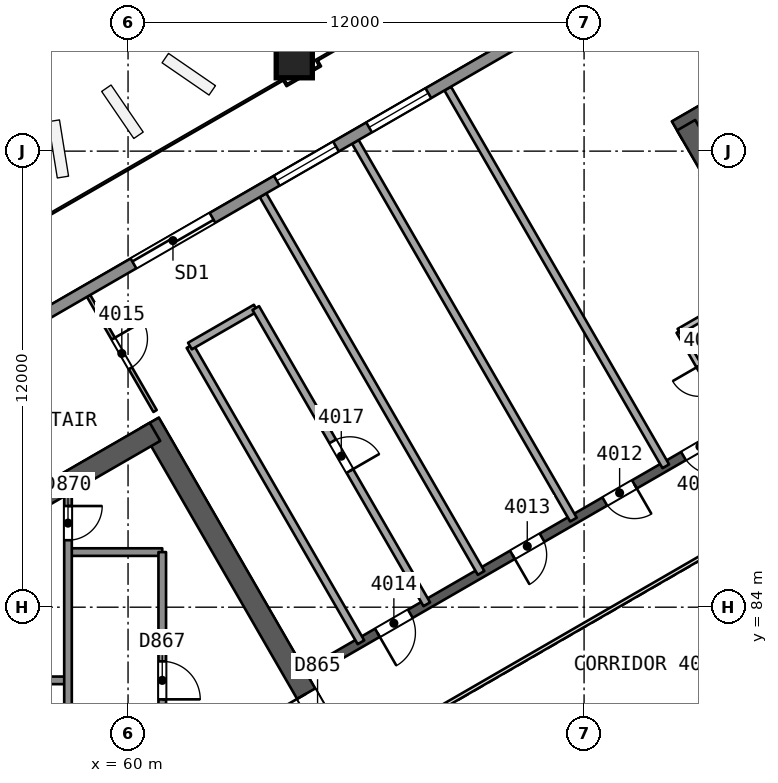
"""IFC4 building model, lengths in metres.
Left out: names, types, materials, properties, quantities, classifications, styles, units other than length and angle.
Written with IfcOpenShell. Run it as: python <this file> out.ifc"""

import sys

from ifc_helpers import new_model, si_unit, direction, frame, frame_2d, origin, origin_2d, place, context, subcontext, project, spatial, rectangle, extrude, element, fill, save


model = new_model("IFC4")
c1 = context("Model", 3, precision=1e-05, world=origin(), true_north=direction((0.0, 1.0)))
c2 = subcontext(c1, "Body", "Model", "MODEL_VIEW")
j1 = project(units=[si_unit("LENGTHUNIT", "METRE"), si_unit("PLANEANGLEUNIT", "RADIAN")], contexts=[c1])
p1 = place(None, origin())
s1 = spatial("IfcSite", under=j1, at=p1, CompositionType="ELEMENT")
p2 = place(p1, origin())
s2 = spatial("IfcBuilding", under=s1, at=p2, CompositionType="ELEMENT")
p3 = place(p2, frame((0.0, 0.0, 167.4)))
s3 = spatial("IfcBuildingStorey", under=s2, at=p3, CompositionType="ELEMENT", Elevation=167.4)
p4 = place(p3, frame((65.682, 80.0, 0.0), z_axis=(0.0, 0.0, 1.0), x_axis=(-0.500000202252, 0.866025287014, 0.0)))
e1 = element("IfcWall", 1, at=p4, inside=s3, PredefinedType="SHEAR", context=c2, shape_type="SweptSolid", body=[
    extrude(rectangle(XDim=10.221, YDim=0.55, at=frame_2d((5.111, 0.0))), origin(), (0.0, 0.0, 1.0), 3.7),
])
p5 = place(p4, frame((0.791, 0.0, 0.0)))
e2 = element("IfcOpeningElement", 2, at=p5, cuts=e1, PredefinedType="OPENING", context=c2, shape_type="SweptSolid", body=[
    extrude(rectangle(XDim=1.2, YDim=2.1, at=frame_2d((0.6, 1.05))), frame((0.0, 0.286, 0.0), z_axis=(0.0, -1.0, 0.0), x_axis=(1.0, 0.0, 0.0)), (0.0, 0.0, 1.0), 0.571),
])
p6 = place(p3, frame((60.709, 88.614, 0.0), z_axis=(0.0, 0.0, 1.0), x_axis=(-0.866020164116, -0.500009075263, 0.0)))
e3 = element("IfcWall", 3, at=p6, inside=s3, PredefinedType="SHEAR", context=c2, shape_type="SweptSolid", body=[
    extrude(rectangle(XDim=14.058, YDim=0.55, at=frame_2d((7.029, 0.0))), origin(), (0.0, 0.0, 1.0), 3.7),
])
p7 = place(p3, frame((86.723, 103.633, 0.0), z_axis=(0.0, 0.0, 1.0), x_axis=(-0.866023530946, -0.500003243837, 0.0)))
e4 = element("IfcWall", 4, at=p7, inside=s3, PredefinedType="SHEAR", context=c2, shape_type="SweptSolid", body=[
    extrude(rectangle(XDim=14.175, YDim=0.55, at=frame_2d((7.087, 0.0))), origin(), (0.0, 0.0, 1.0), 3.7),
])
p8 = place(p3, frame((74.686, 96.683, 0.0), z_axis=(0.0, 0.0, 1.0), x_axis=(0.499997818338, -0.866026663364, 0.0)))
e5 = element("IfcWall", 5, at=p8, inside=s3, PredefinedType="SHEAR", context=c2, shape_type="SweptSolid", body=[
    extrude(rectangle(XDim=10.105, YDim=0.55, at=frame_2d((5.052, 0.0))), origin(), (0.0, 0.0, 1.0), 3.7),
])
p9 = place(p8, frame((7.955, 0.0, 0.0)))
e6 = element("IfcOpeningElement", 6, at=p9, cuts=e5, PredefinedType="OPENING", context=c2, shape_type="SweptSolid", body=[
    extrude(rectangle(XDim=1.2, YDim=2.1, at=frame_2d((0.6, 1.05))), frame((0.0, 0.286, 0.0), z_axis=(0.0, -1.0, 0.0), x_axis=(1.0, 0.0, 0.0)), (0.0, 0.0, 1.0), 0.571),
])
p10 = place(p3, frame((78.2, 90.046, 0.0), z_axis=(0.0, 0.0, 1.0), x_axis=(-0.866026492143, -0.499998114903, 0.0)))
e7 = element("IfcWall", 7, at=p10, inside=s3, PredefinedType="SHEAR", context=c2, shape_type="SweptSolid", body=[
    extrude(rectangle(XDim=15.588, YDim=0.25, at=frame_2d((7.794, 0.0))), origin(), (0.0, 0.0, 1.0), 3.25),
])
p11 = place(p10, frame((3.138, 0.0, 0.0)))
e8 = element("IfcOpeningElement", 8, at=p11, cuts=e7, PredefinedType="OPENING", context=c2, shape_type="SweptSolid", body=[
    extrude(rectangle(XDim=1.0, YDim=2.1, at=frame_2d((0.5, 1.05))), frame((0.0, 0.135, 0.0), z_axis=(0.0, -1.0, 0.0), x_axis=(1.0, 0.0, 0.0)), (0.0, 0.0, 1.0), 0.271),
])
p12 = place(p10, frame((5.629, 0.0, 0.0)))
e9 = element("IfcOpeningElement", 9, at=p12, cuts=e7, PredefinedType="OPENING", context=c2, shape_type="SweptSolid", body=[
    extrude(rectangle(XDim=0.9, YDim=2.1, at=frame_2d((0.45, 1.05))), frame((0.0, 0.135, 0.0), z_axis=(0.0, -1.0, 0.0), x_axis=(1.0, 0.0, 0.0)), (0.0, 0.0, 1.0), 0.271),
])
p13 = place(p10, frame((8.435, 0.0, 0.0)))
e10 = element("IfcOpeningElement", 10, at=p13, cuts=e7, PredefinedType="OPENING", context=c2, shape_type="SweptSolid", body=[
    extrude(rectangle(XDim=0.9, YDim=2.1, at=frame_2d((0.45, 1.05))), frame((0.0, 0.135, 0.0), z_axis=(0.0, -1.0, 0.0), x_axis=(1.0, 0.0, 0.0)), (0.0, 0.0, 1.0), 0.271),
])
p14 = place(p10, frame((12.438, 0.0, 0.0)))
e11 = element("IfcOpeningElement", 11, at=p14, cuts=e7, PredefinedType="OPENING", context=c2, shape_type="SweptSolid", body=[
    extrude(rectangle(XDim=1.0, YDim=2.1, at=frame_2d((0.5, 1.05))), frame((0.0, 0.135, 0.0), z_axis=(0.0, -1.0, 0.0), x_axis=(1.0, 0.0, 0.0)), (0.0, 0.0, 1.0), 0.271),
])
p15 = place(p3, frame((64.362, 98.426, 0.0), z_axis=(0.010092954999, -0.017481261926, 0.999796248113), x_axis=(-0.499902903628, 0.86584618997, 0.020185694418)))
e12 = element("IfcColumn", 12, at=p15, inside=s3, PredefinedType="COLUMN", context=c2, shape_type="SweptSolid", body=[
    extrude(rectangle(XDim=0.95, YDim=0.95, at=origin_2d()), origin(), (0.0, 0.0, 1.0), 3.701),
])
p16 = place(p3, frame((75.948, 88.746, 0.0), z_axis=(0.0, 0.0, 1.0), x_axis=(-0.499987231761, 0.866032775405, 0.0)))
e13 = element("IfcWall", 13, at=p16, inside=s3, PredefinedType="PARTITIONING", context=c2, shape_type="SweptSolid", body=[
    extrude(rectangle(XDim=2.9, YDim=0.15, at=frame_2d((1.45, 0.0))), origin(), (0.0, 0.0, 1.0), 3.25),
])
p17 = place(p16, frame((1.05, 0.0, 0.0)))
e14 = element("IfcOpeningElement", 14, at=p17, cuts=e13, PredefinedType="OPENING", context=c2, shape_type="SweptSolid", body=[
    extrude(rectangle(XDim=0.8, YDim=2.1, at=frame_2d((0.4, 1.05))), frame((0.0, 0.085, 0.0), z_axis=(0.0, -1.0, 0.0), x_axis=(1.0, 0.0, 0.0)), (0.0, 0.0, 1.0), 0.171),
])
p18 = place(p3, frame((74.498, 91.257, 0.0), z_axis=(0.0, 0.0, 1.0), x_axis=(0.866038271014, 0.499977712642, 0.0)))
e15 = element("IfcWall", 15, at=p18, inside=s3, PredefinedType="PARTITIONING", context=c2, shape_type="SweptSolid", body=[
    extrude(rectangle(XDim=2.401, YDim=0.15, at=frame_2d((1.2, 0.0))), origin(), (0.0, 0.0, 1.0), 3.25),
])
for number, where, z_axis, x_axis in (
    (16, (68.411, 97.647, 0.0), (0.0, 0.0, 1.0), (0.5, -0.866, 0.0)),
    (17, (65.981, 96.244, 0.0), (0.0, 0.0, 1.0), (0.5, -0.866, 0.0)),
    (18, (63.552, 94.841, 0.0), (0.0, 0.0, 1.0), (0.5, -0.866, 0.0)),
):
    element("IfcWall", number, at=place(p3, frame(where, z_axis=z_axis, x_axis=x_axis)), inside=s3, PredefinedType="PARTITIONING", context=c2, shape_type="SweptSolid", body=[
        extrude(rectangle(XDim=11.477, YDim=0.2, at=frame_2d((5.739, 0.0))), origin(), (0.0, 0.0, 1.0), 3.25),
    ])
p19 = place(p3, frame((58.961, 92.191, 0.0), z_axis=(0.0, 0.0, 1.0), x_axis=(0.499982229883, -0.866035663123, 0.0)))
e19 = element("IfcWall", 19, at=p19, inside=s3, PredefinedType="PARTITIONING", context=c2, shape_type="SweptSolid", body=[
    extrude(rectangle(XDim=3.498, YDim=0.1, at=frame_2d((1.749, 0.0))), origin(), (0.0, 0.0, 1.0), 3.25),
])
p20 = place(p19, frame((1.299, 0.0, 0.0)))
e20 = element("IfcOpeningElement", 20, at=p20, cuts=e19, PredefinedType="OPENING", context=c2, shape_type="SweptSolid", body=[
    extrude(rectangle(XDim=0.9, YDim=2.1, at=frame_2d((0.45, 1.05))), frame((0.0, 0.061, 0.0), z_axis=(0.0, -1.0, 0.0), x_axis=(1.0, 0.0, 0.0)), (0.0, 0.0, 1.0), 0.121),
])
p21 = place(p3, frame((66.129, 83.077, 0.0), z_axis=(0.0, 0.0, 1.0), x_axis=(-0.5000018851, 0.866024315419, 0.0)))
e21 = element("IfcWall", 21, at=p21, inside=s3, PredefinedType="PARTITIONING", context=c2, shape_type="SweptSolid", body=[
    extrude(rectangle(XDim=9.0, YDim=0.2, at=frame_2d((4.5, 0.0))), origin(), (0.0, 0.0, 1.0), 3.25),
])
p22 = place(p3, frame((61.629, 90.871, 0.0), z_axis=(0.0, 0.0, 1.0), x_axis=(0.866041268327, 0.499972520799, 0.0)))
e22 = element("IfcWall", 22, at=p22, inside=s3, PredefinedType="PARTITIONING", context=c2, shape_type="SweptSolid", body=[
    extrude(rectangle(XDim=2.0, YDim=0.2, at=frame_2d((1.0, 0.0))), origin(), (0.0, 0.0, 1.0), 3.25),
])
p23 = place(p3, frame((63.361, 91.871, 0.0), z_axis=(0.0, 0.0, 1.0), x_axis=(0.5000018851, -0.866024315419, 0.0)))
e23 = element("IfcWall", 23, at=p23, inside=s3, PredefinedType="PARTITIONING", context=c2, shape_type="SweptSolid", body=[
    extrude(rectangle(XDim=9.0, YDim=0.2, at=frame_2d((4.5, 0.0))), origin(), (0.0, 0.0, 1.0), 3.25),
])
p24 = place(p23, frame((4.05, 0.0, 0.0)))
e24 = element("IfcOpeningElement", 24, at=p24, cuts=e23, PredefinedType="OPENING", context=c2, shape_type="SweptSolid", body=[
    extrude(rectangle(XDim=0.9, YDim=2.1, at=frame_2d((0.45, 1.05))), frame((0.0, 0.11, 0.0), z_axis=(0.0, -1.0, 0.0), x_axis=(1.0, 0.0, 0.0)), (0.0, 0.0, 1.0), 0.221),
])
p25 = place(p3, frame((42.319, 82.755, 0.0), z_axis=(0.0, 0.0, 1.0), x_axis=(0.866024017239, 0.50000240156, 0.0)))
e25 = element("IfcWall", 25, at=p25, inside=s3, PredefinedType="SOLIDWALL", context=c2, shape_type="SweptSolid", body=[
    extrude(rectangle(XDim=53.85, YDim=0.3, at=frame_2d((26.925, 0.0))), origin(), (0.0, 0.0, 1.0), 3.25),
])
p26 = place(p25, frame((20.581, 0.0, 0.0)))
e26 = element("IfcOpeningElement", 26, at=p26, cuts=e25, PredefinedType="OPENING", context=c2, shape_type="SweptSolid", body=[
    extrude(rectangle(XDim=2.4, YDim=2.4, at=frame_2d((1.2, 1.2))), frame((0.0, 0.161, 0.0), z_axis=(0.0, -1.0, 0.0), x_axis=(1.0, 0.0, 0.0)), (0.0, 0.0, 1.0), 0.321),
])
p27 = place(p25, frame((9.622, 0.0, 0.0)))
e27 = element("IfcOpeningElement", 27, at=p27, cuts=e25, PredefinedType="OPENING", context=c2, shape_type="SweptSolid", body=[
    extrude(rectangle(XDim=2.4, YDim=2.4, at=frame_2d((1.2, 1.2))), frame((0.0, 0.161, 0.0), z_axis=(0.0, -1.0, 0.0), x_axis=(1.0, 0.0, 0.0)), (0.0, 0.0, 1.0), 0.321),
])
p28 = place(p25, frame((40.79, 0.0, 0.0)))
e28 = element("IfcOpeningElement", 28, at=p28, cuts=e25, PredefinedType="OPENING", context=c2, shape_type="SweptSolid", body=[
    extrude(rectangle(XDim=2.4, YDim=2.4, at=frame_2d((1.2, 1.2))), frame((0.0, 0.161, 0.0), z_axis=(0.0, -1.0, 0.0), x_axis=(1.0, 0.0, 0.0)), (0.0, 0.0, 1.0), 0.321),
])
p29 = place(p25, frame((27.74, 0.0, 0.9)))
e29 = element("IfcOpeningElement", 29, at=p29, cuts=e25, PredefinedType="OPENING", context=c2, shape_type="SweptSolid", body=[
    extrude(rectangle(XDim=1.8, YDim=1.5, at=frame_2d((0.9, 0.75))), frame((0.0, 0.161, 0.0), z_axis=(0.0, -1.0, 0.0), x_axis=(1.0, 0.0, 0.0)), (0.0, 0.0, 1.0), 0.321),
])
p30 = place(p25, frame((24.934, 0.0, 0.9)))
e30 = element("IfcOpeningElement", 30, at=p30, cuts=e25, PredefinedType="OPENING", context=c2, shape_type="SweptSolid", body=[
    extrude(rectangle(XDim=1.8, YDim=1.5, at=frame_2d((0.9, 0.75))), frame((0.0, 0.161, 0.0), z_axis=(0.0, -1.0, 0.0), x_axis=(1.0, 0.0, 0.0)), (0.0, 0.0, 1.0), 0.321),
])
p31 = place(p3, frame((60.9, 85.45, 0.0), z_axis=(0.0, 0.0, 1.0), x_axis=(-1.0, 0.0, 0.0)))
e31 = element("IfcWall", 31, at=p31, inside=s3, PredefinedType="SOLIDWALL", context=c2, shape_type="SweptSolid", body=[
    extrude(rectangle(XDim=2.48, YDim=0.2, at=frame_2d((1.24, 0.0))), origin(), (0.0, 0.0, 1.0), 3.25),
])
p32 = place(p3, frame((58.42, 82.075, 0.0), z_axis=(0.0, 0.0, 1.0), x_axis=(-1.0, 0.0, 0.0)))
e32 = element("IfcWall", 32, at=p32, inside=s3, PredefinedType="SOLIDWALL", context=c2, shape_type="SweptSolid", body=[
    extrude(rectangle(XDim=7.7, YDim=0.2, at=frame_2d((3.85, 0.0))), origin(), (0.0, 0.0, 1.0), 3.25),
])
p33 = place(p3, frame((60.9, 85.45, 0.0), z_axis=(0.0, 0.0, 1.0), x_axis=(0.0, -1.0, 0.0)))
e33 = element("IfcWall", 33, at=p33, inside=s3, PredefinedType="SOLIDWALL", context=c2, shape_type="SweptSolid", body=[
    extrude(rectangle(XDim=10.9, YDim=0.2, at=frame_2d((5.45, 0.0))), origin(), (0.0, 0.0, 1.0), 3.25),
])
p34 = place(p33, frame((2.875, 0.0, 0.0)))
e34 = element("IfcOpeningElement", 34, at=p34, cuts=e33, PredefinedType="OPENING", context=c2, shape_type="SweptSolid", body=[
    extrude(rectangle(XDim=1.0, YDim=2.1, at=frame_2d((0.5, 1.05))), frame((0.0, 0.11, 0.0), z_axis=(0.0, -1.0, 0.0), x_axis=(1.0, 0.0, 0.0)), (0.0, 0.0, 1.0), 0.221),
])
p35 = place(p33, frame((7.375, 0.0, 0.0)))
e35 = element("IfcOpeningElement", 35, at=p35, cuts=e33, PredefinedType="OPENING", context=c2, shape_type="SweptSolid", body=[
    extrude(rectangle(XDim=1.0, YDim=2.1, at=frame_2d((0.5, 1.05))), frame((0.0, 0.11, 0.0), z_axis=(0.0, -1.0, 0.0), x_axis=(1.0, 0.0, 0.0)), (0.0, 0.0, 1.0), 0.221),
])
p36 = place(p3, frame((58.42, 86.974, 0.0), z_axis=(0.0, 0.0, 1.0), x_axis=(0.0, -1.0, 0.0)))
e36 = element("IfcWall", 36, at=p36, inside=s3, PredefinedType="SOLIDWALL", context=c2, shape_type="SweptSolid", body=[
    extrude(rectangle(XDim=10.524, YDim=0.2, at=frame_2d((5.262, 0.0))), origin(), (0.0, 0.0, 1.0), 3.25),
])
p37 = place(p36, frame((0.312, 0.0, 0.0)))
e37 = element("IfcOpeningElement", 37, at=p37, cuts=e36, PredefinedType="OPENING", context=c2, shape_type="SweptSolid", body=[
    extrude(rectangle(XDim=0.9, YDim=2.1, at=frame_2d((0.45, 1.05))), frame((0.0, 0.11, 0.0), z_axis=(0.0, -1.0, 0.0), x_axis=(1.0, 0.0, 0.0)), (0.0, 0.0, 1.0), 0.221),
])
p38 = place(p3, frame((77.738, 86.846, 0.0), z_axis=(0.0, 0.0, 1.0), x_axis=(-0.866026658274, -0.499997827154, 0.0)))
e38 = element("IfcWall", 38, at=p38, inside=s3, PredefinedType="PARTITIONING", context=c2, shape_type="SweptSolid", body=[
    extrude(rectangle(XDim=11.588, YDim=0.1, at=frame_2d((5.794, 0.0))), origin(), (0.0, 0.0, 1.0), 3.25),
])
p39 = place(p11, origin())
e39 = element("IfcDoor", 39, at=p39, inside=s3, OperationType="SINGLE_SWING_LEFT", PredefinedType="NOTDEFINED", context=c2, shape_type="SweptSolid", body=[
    extrude(rectangle(XDim=1.0, YDim=2.1, at=frame_2d((0.5, 1.05))), frame((0.0, 0.025, 0.0), z_axis=(0.0, -1.0, 0.0), x_axis=(1.0, 0.0, 0.0)), (0.0, 0.0, 1.0), 0.05),
])
fill(e8, e39)
p40 = place(p12, origin())
e40 = element("IfcDoor", 40, at=p40, inside=s3, OperationType="SINGLE_SWING_LEFT", PredefinedType="NOTDEFINED", context=c2, shape_type="SweptSolid", body=[
    extrude(rectangle(XDim=0.9, YDim=2.1, at=frame_2d((0.45, 1.05))), frame((0.0, 0.025, 0.0), z_axis=(0.0, -1.0, 0.0), x_axis=(1.0, 0.0, 0.0)), (0.0, 0.0, 1.0), 0.05),
])
fill(e9, e40)
p41 = place(p13, origin())
e41 = element("IfcDoor", 41, at=p41, inside=s3, OperationType="SINGLE_SWING_RIGHT", PredefinedType="NOTDEFINED", context=c2, shape_type="SweptSolid", body=[
    extrude(rectangle(XDim=0.9, YDim=2.1, at=frame_2d((0.45, 1.05))), frame((0.0, 0.025, 0.0), z_axis=(0.0, -1.0, 0.0), x_axis=(1.0, 0.0, 0.0)), (0.0, 0.0, 1.0), 0.05),
])
fill(e10, e41)
p42 = place(p14, origin())
e42 = element("IfcDoor", 42, at=p42, inside=s3, OperationType="SINGLE_SWING_RIGHT", PredefinedType="NOTDEFINED", context=c2, shape_type="SweptSolid", body=[
    extrude(rectangle(XDim=1.0, YDim=2.1, at=frame_2d((0.5, 1.05))), frame((0.0, 0.025, 0.0), z_axis=(0.0, -1.0, 0.0), x_axis=(1.0, 0.0, 0.0)), (0.0, 0.0, 1.0), 0.05),
])
fill(e11, e42)
p43 = place(p20, origin())
e43 = element("IfcDoor", 43, at=p43, inside=s3, OperationType="SINGLE_SWING_LEFT", PredefinedType="NOTDEFINED", context=c2, shape_type="SweptSolid", body=[
    extrude(rectangle(XDim=0.9, YDim=2.1, at=frame_2d((0.45, 1.05))), frame((0.0, 0.025, 0.0), z_axis=(0.0, -1.0, 0.0), x_axis=(1.0, 0.0, 0.0)), (0.0, 0.0, 1.0), 0.05),
])
fill(e20, e43)
p44 = place(p24, origin())
e44 = element("IfcDoor", 44, at=p44, inside=s3, OperationType="SINGLE_SWING_RIGHT", PredefinedType="NOTDEFINED", context=c2, shape_type="SweptSolid", body=[
    extrude(rectangle(XDim=0.9, YDim=2.1, at=frame_2d((0.45, 1.05))), frame((0.0, 0.025, 0.0), z_axis=(0.0, -1.0, 0.0), x_axis=(1.0, 0.0, 0.0)), (0.0, 0.0, 1.0), 0.05),
])
fill(e24, e44)
p45 = place(p26, origin())
e45 = element("IfcDoor", 45, at=p45, inside=s3, OperationType="SLIDING_TO_LEFT", PredefinedType="NOTDEFINED", context=c2, shape_type="SweptSolid", body=[
    extrude(rectangle(XDim=2.4, YDim=2.4, at=frame_2d((1.2, 1.2))), frame((0.0, 0.025, 0.0), z_axis=(0.0, -1.0, 0.0), x_axis=(1.0, 0.0, 0.0)), (0.0, 0.0, 1.0), 0.05),
])
fill(e26, e45)
p46 = place(p29, origin())
e46 = element("IfcWindow", 46, at=p46, inside=s3, PartitioningType="SINGLE_PANEL", PredefinedType="WINDOW", context=c2, shape_type="SweptSolid", body=[
    extrude(rectangle(XDim=1.8, YDim=1.5, at=frame_2d((0.9, 0.75))), frame((0.0, 0.03, 0.0), z_axis=(0.0, -1.0, 0.0), x_axis=(1.0, 0.0, 0.0)), (0.0, 0.0, 1.0), 0.06),
])
fill(e29, e46)
p47 = place(p30, origin())
e47 = element("IfcWindow", 47, at=p47, inside=s3, PartitioningType="SINGLE_PANEL", PredefinedType="WINDOW", context=c2, shape_type="SweptSolid", body=[
    extrude(rectangle(XDim=1.8, YDim=1.5, at=frame_2d((0.9, 0.75))), frame((0.0, 0.03, 0.0), z_axis=(0.0, -1.0, 0.0), x_axis=(1.0, 0.0, 0.0)), (0.0, 0.0, 1.0), 0.06),
])
fill(e30, e47)
p48 = place(p5, origin())
e48 = element("IfcDoor", 48, at=p48, inside=s3, OperationType="SINGLE_SWING_RIGHT", PredefinedType="NOTDEFINED", context=c2, shape_type="SweptSolid", body=[
    extrude(rectangle(XDim=1.2, YDim=2.1, at=frame_2d((0.6, 1.05))), frame((0.0, 0.025, 0.0), z_axis=(0.0, -1.0, 0.0), x_axis=(1.0, 0.0, 0.0)), (0.0, 0.0, 1.0), 0.05),
])
fill(e2, e48)
p49 = place(p34, origin())
e49 = element("IfcDoor", 49, at=p49, inside=s3, OperationType="SINGLE_SWING_RIGHT", PredefinedType="NOTDEFINED", context=c2, shape_type="SweptSolid", body=[
    extrude(rectangle(XDim=1.0, YDim=2.1, at=frame_2d((0.5, 1.05))), frame((0.0, 0.025, 0.0), z_axis=(0.0, -1.0, 0.0), x_axis=(1.0, 0.0, 0.0)), (0.0, 0.0, 1.0), 0.05),
])
fill(e34, e49)
p50 = place(p37, origin())
e50 = element("IfcDoor", 50, at=p50, inside=s3, OperationType="SINGLE_SWING_LEFT", PredefinedType="NOTDEFINED", context=c2, shape_type="SweptSolid", body=[
    extrude(rectangle(XDim=0.9, YDim=2.1, at=frame_2d((0.45, 1.05))), frame((0.0, 0.025, 0.0), z_axis=(0.0, -1.0, 0.0), x_axis=(1.0, 0.0, 0.0)), (0.0, 0.0, 1.0), 0.05),
])
fill(e37, e50)
save(model, sys.argv[1])
